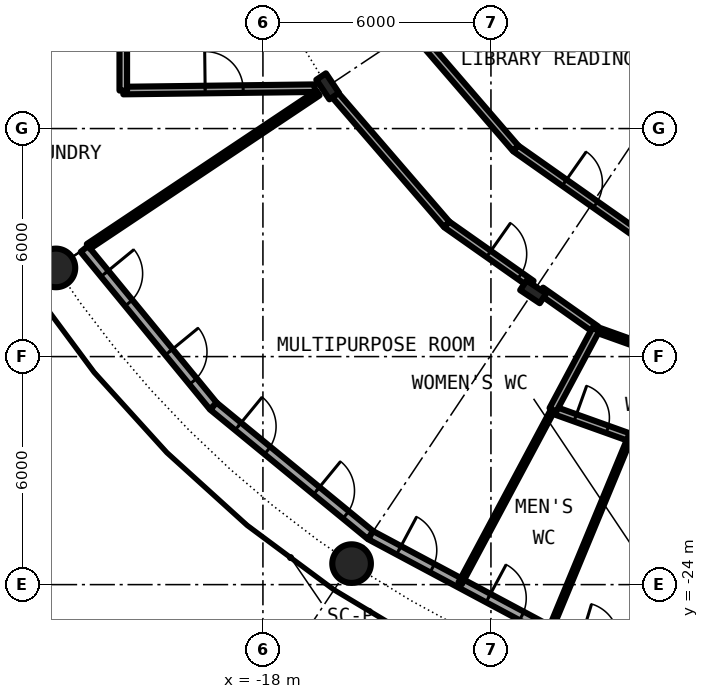
"""IFC4 building model, lengths in metres.
Left out: names, types, materials, properties, quantities, classifications, styles, units other than length and angle.
Written with IfcOpenShell. Run it as: python <this file> out.ifc"""

import sys

from ifc_helpers import new_model, si_unit, direction, frame, frame_2d, origin, origin_2d, place, context, subcontext, project, spatial, rectangle, hollow_circle, i_section, extrude, element, fill, save


model = new_model("IFC4")
c1 = context("Model", 3, precision=1e-05, world=origin(), true_north=direction((0.0, 1.0)))
c2 = subcontext(c1, "Body", "Model", "MODEL_VIEW")
j1 = project(units=[si_unit("LENGTHUNIT", "METRE"), si_unit("PLANEANGLEUNIT", "RADIAN")], contexts=[c1])
p1 = place(None, origin())
s1 = spatial("IfcSite", under=j1, at=p1, CompositionType="ELEMENT")
p2 = place(p1, origin())
s2 = spatial("IfcBuilding", under=s1, at=p2, CompositionType="ELEMENT")
p3 = place(p2, frame((0.0, 0.0, 53.3)))
s3 = spatial("IfcBuildingStorey", under=s2, at=p3, CompositionType="ELEMENT", Elevation=53.3)
for number, where, z_axis, x_axis in (
    (1, (-23.448, -15.667, 0.0), (0.0, 0.0, 1.0), (1.0, 0.0, 0.0)),
    (2, (-15.667, -23.448, 0.0), (0.0, 0.0, 1.0), (1.0, 0.0, 0.0)),
):
    element("IfcColumn", number, at=place(p3, frame(where, z_axis=z_axis, x_axis=x_axis)), inside=s3, PredefinedType="COLUMN", context=c2, shape_type="SweptSolid", body=[
        extrude(hollow_circle(Radius=0.508, WallThickness=0.05, at=origin_2d()), origin(), (0.0, 0.0, 1.0), 4.2),
    ])
for number, where, z_axis, x_axis in (
    (3, (-16.297, -10.889, 0.0), (0.0, 0.0, 1.0), (-0.831, -0.556, 0.0)),
    (4, (-10.889, -16.297, 0.0), (0.0, 0.0, 1.0), (-0.556, -0.831, 0.0)),
):
    element("IfcColumn", number, at=place(p3, frame(where, z_axis=z_axis, x_axis=x_axis)), inside=s3, PredefinedType="COLUMN", context=c2, shape_type="SweptSolid", body=[
        extrude(i_section(OverallWidth=0.305, OverallDepth=0.62, WebThickness=0.021, FlangeThickness=0.04, FilletRadius=0.027, at=origin_2d()), origin(), (0.0, 0.0, 1.0), 4.2),
    ])
p4 = place(p3, frame((-22.699, -15.167, 0.0), z_axis=(0.0, 0.0, 1.0), x_axis=(0.634382322723, -0.773019449054, 0.0)))
e5 = element("IfcWall", 5, at=p4, inside=s3, PredefinedType="SOLIDWALL", context=c2, shape_type="SweptSolid", body=[
    extrude(rectangle(XDim=5.352, YDim=0.25, at=frame_2d((2.676, 0.0))), origin(), (0.0, 0.0, 1.0), 3.8),
])
p5 = place(p4, frame((0.841, 0.0, 0.0)))
e6 = element("IfcOpeningElement", 6, at=p5, cuts=e5, PredefinedType="OPENING", context=c2, shape_type="SweptSolid", body=[
    extrude(rectangle(XDim=1.0, YDim=2.2, at=frame_2d((0.5, 1.1))), frame((0.0, 0.135, 0.0), z_axis=(0.0, -1.0, 0.0), x_axis=(1.0, 0.0, 0.0)), (0.0, 0.0, 1.0), 0.27),
])
p6 = place(p4, frame((3.51, 0.0, 0.0)))
e7 = element("IfcOpeningElement", 7, at=p6, cuts=e5, PredefinedType="OPENING", context=c2, shape_type="SweptSolid", body=[
    extrude(rectangle(XDim=1.0, YDim=2.2, at=frame_2d((0.5, 1.1))), frame((0.0, 0.135, 0.0), z_axis=(0.0, -1.0, 0.0), x_axis=(1.0, 0.0, 0.0)), (0.0, 0.0, 1.0), 0.27),
])
p7 = place(p3, frame((-19.304, -19.304, 0.0), z_axis=(0.0, 0.0, 1.0), x_axis=(0.773019449054, -0.634382322723, 0.0)))
e8 = element("IfcWall", 8, at=p7, inside=s3, PredefinedType="SOLIDWALL", context=c2, shape_type="SweptSolid", body=[
    extrude(rectangle(XDim=5.352, YDim=0.25, at=frame_2d((2.676, 0.0))), origin(), (0.0, 0.0, 1.0), 3.8),
])
p8 = place(p7, frame((0.841, 0.0, 0.0)))
e9 = element("IfcOpeningElement", 9, at=p8, cuts=e8, PredefinedType="OPENING", context=c2, shape_type="SweptSolid", body=[
    extrude(rectangle(XDim=1.0, YDim=2.2, at=frame_2d((0.5, 1.1))), frame((0.0, 0.135, 0.0), z_axis=(0.0, -1.0, 0.0), x_axis=(1.0, 0.0, 0.0)), (0.0, 0.0, 1.0), 0.27),
])
p9 = place(p7, frame((3.51, 0.0, 0.0)))
e10 = element("IfcOpeningElement", 10, at=p9, cuts=e8, PredefinedType="OPENING", context=c2, shape_type="SweptSolid", body=[
    extrude(rectangle(XDim=1.0, YDim=2.2, at=frame_2d((0.5, 1.1))), frame((0.0, 0.135, 0.0), z_axis=(0.0, -1.0, 0.0), x_axis=(1.0, 0.0, 0.0)), (0.0, 0.0, 1.0), 0.27),
])
p10 = place(p3, frame((-15.167, -22.699, 0.0), z_axis=(0.0, 0.0, 1.0), x_axis=(0.881915646801, -0.471407246368, 0.0)))
e11 = element("IfcWall", 11, at=p10, inside=s3, PredefinedType="SOLIDWALL", context=c2, shape_type="SweptSolid", body=[
    extrude(rectangle(XDim=5.352, YDim=0.25, at=frame_2d((2.676, 0.0))), origin(), (0.0, 0.0, 1.0), 3.8),
])
p11 = place(p10, frame((0.841, 0.0, 0.0)))
e12 = element("IfcOpeningElement", 12, at=p11, cuts=e11, PredefinedType="OPENING", context=c2, shape_type="SweptSolid", body=[
    extrude(rectangle(XDim=1.0, YDim=2.2, at=frame_2d((0.5, 1.1))), frame((0.0, 0.135, 0.0), z_axis=(0.0, -1.0, 0.0), x_axis=(1.0, 0.0, 0.0)), (0.0, 0.0, 1.0), 0.27),
])
p12 = place(p10, frame((3.51, 0.0, 0.0)))
e13 = element("IfcOpeningElement", 13, at=p12, cuts=e11, PredefinedType="OPENING", context=c2, shape_type="SweptSolid", body=[
    extrude(rectangle(XDim=1.0, YDim=2.2, at=frame_2d((0.5, 1.1))), frame((0.0, 0.135, 0.0), z_axis=(0.0, -1.0, 0.0), x_axis=(1.0, 0.0, 0.0)), (0.0, 0.0, 1.0), 0.27),
])
p13 = place(p3, frame((-10.373, -19.401, 0.0), z_axis=(0.0, 0.0, 1.0), x_axis=(0.941534771306, -0.336915826909, 0.0)))
e14 = element("IfcWall", 14, at=p13, inside=s3, PredefinedType="PARTITIONING", context=c2, shape_type="SweptSolid", body=[
    extrude(rectangle(XDim=6.459, YDim=0.2, at=frame_2d((3.229, 0.0))), origin(), (0.0, 0.0, 1.0), 3.8),
])
p14 = place(p13, frame((0.627, 0.0, 0.0)))
e15 = element("IfcOpeningElement", 15, at=p14, cuts=e14, PredefinedType="OPENING", context=c2, shape_type="SweptSolid", body=[
    extrude(rectangle(XDim=0.9, YDim=2.3, at=frame_2d((0.45, 1.15))), frame((0.0, 0.11, 0.0), z_axis=(0.0, -1.0, 0.0), x_axis=(1.0, 0.0, 0.0)), (0.0, 0.0, 1.0), 0.22),
])
p15 = place(p13, frame((2.781, 0.0, 0.0)))
e16 = element("IfcOpeningElement", 16, at=p15, cuts=e14, PredefinedType="OPENING", context=c2, shape_type="SweptSolid", body=[
    extrude(rectangle(XDim=0.9, YDim=2.3, at=frame_2d((0.45, 1.15))), frame((0.0, 0.11, 0.0), z_axis=(0.0, -1.0, 0.0), x_axis=(1.0, 0.0, 0.0)), (0.0, 0.0, 1.0), 0.22),
])
p16 = place(p13, frame((4.933, 0.0, 0.0)))
e17 = element("IfcOpeningElement", 17, at=p16, cuts=e14, PredefinedType="OPENING", context=c2, shape_type="SweptSolid", body=[
    extrude(rectangle(XDim=0.9, YDim=2.3, at=frame_2d((0.45, 1.15))), frame((0.0, 0.11, 0.0), z_axis=(0.0, -1.0, 0.0), x_axis=(1.0, 0.0, 0.0)), (0.0, 0.0, 1.0), 0.22),
])
p17 = place(p3, frame((-16.196, -11.006, 0.0), z_axis=(0.0, 0.0, 1.0), x_axis=(0.653087281304, -0.757282644063, 0.0)))
e18 = element("IfcWall", 18, at=p17, inside=s3, PredefinedType="PARTITIONING", context=c2, shape_type="SweptSolid", body=[
    extrude(rectangle(XDim=4.644, YDim=0.2, at=frame_2d((2.322, 0.0))), origin(), (0.0, 0.0, 1.0), 3.48),
])
p18 = place(p3, frame((-13.163, -14.523, 0.0), z_axis=(0.0, 0.0, 1.0), x_axis=(0.817764243714, -0.575553335237, 0.0)))
e19 = element("IfcWall", 19, at=p18, inside=s3, PredefinedType="PARTITIONING", context=c2, shape_type="SweptSolid", body=[
    extrude(rectangle(XDim=2.725, YDim=0.2, at=frame_2d((1.362, 0.0))), origin(), (0.0, 0.0, 1.0), 3.48),
])
p19 = place(p18, frame((1.35, 0.0, 0.0)))
e20 = element("IfcOpeningElement", 20, at=p19, cuts=e19, PredefinedType="OPENING", context=c2, shape_type="SweptSolid", body=[
    extrude(rectangle(XDim=1.0, YDim=2.3, at=frame_2d((0.5, 1.15))), frame((0.0, 0.11, 0.0), z_axis=(0.0, -1.0, 0.0), x_axis=(1.0, 0.0, 0.0)), (0.0, 0.0, 1.0), 0.22),
])
p20 = place(p3, frame((-10.686, -16.267, 0.0), z_axis=(0.0, 0.0, 1.0), x_axis=(0.81766692021, -0.575691590693, 0.0)))
e21 = element("IfcWall", 21, at=p20, inside=s3, PredefinedType="PARTITIONING", context=c2, shape_type="SweptSolid", body=[
    extrude(rectangle(XDim=1.77, YDim=0.2, at=frame_2d((0.885, 0.0))), origin(), (0.0, 0.0, 1.0), 3.48),
])
p21 = place(p3, frame((-9.239, -17.286, 0.0), z_axis=(0.0, 0.0, 1.0), x_axis=(0.94157995483, -0.336789531699, 0.0)))
e22 = element("IfcWall", 22, at=p21, inside=s3, PredefinedType="PARTITIONING", context=c2, shape_type="SweptSolid", body=[
    extrude(rectangle(XDim=5.597, YDim=0.15, at=frame_2d((2.798, 0.0))), origin(), (0.0, 0.0, 1.0), 3.48),
])
p22 = place(p21, frame((2.376, 0.0, 0.0)))
e23 = element("IfcOpeningElement", 23, at=p22, cuts=e22, PredefinedType="OPENING", context=c2, shape_type="SweptSolid", body=[
    extrude(rectangle(XDim=1.0, YDim=2.3, at=frame_2d((0.5, 1.15))), frame((0.0, 0.085, 0.0), z_axis=(0.0, -1.0, 0.0), x_axis=(1.0, 0.0, 0.0)), (0.0, 0.0, 1.0), 0.17),
])
p23 = place(p3, frame((-14.043, -9.4, 0.0), z_axis=(0.0, 0.0, 1.0), x_axis=(0.653274518104, -0.757121129012, 0.0)))
e24 = element("IfcWall", 24, at=p23, inside=s3, PredefinedType="PARTITIONING", context=c2, shape_type="SweptSolid", body=[
    extrude(rectangle(XDim=4.124, YDim=0.2, at=frame_2d((2.062, 0.0))), origin(), (0.0, 0.0, 1.0), 3.8),
])
p24 = place(p3, frame((-11.349, -12.522, 0.0), z_axis=(0.0, 0.0, 1.0), x_axis=(0.817567680547, -0.575832517079, 0.0)))
e25 = element("IfcWall", 25, at=p24, inside=s3, PredefinedType="PARTITIONING", context=c2, shape_type="SweptSolid", body=[
    extrude(rectangle(XDim=4.137, YDim=0.2, at=frame_2d((2.068, 0.0))), origin(), (0.0, 0.0, 1.0), 3.8),
])
p25 = place(p24, frame((1.568, 0.0, 0.0)))
e26 = element("IfcOpeningElement", 26, at=p25, cuts=e25, PredefinedType="OPENING", context=c2, shape_type="SweptSolid", body=[
    extrude(rectangle(XDim=1.0, YDim=2.3, at=frame_2d((0.5, 1.15))), frame((0.0, 0.11, 0.0), z_axis=(0.0, -1.0, 0.0), x_axis=(1.0, 0.0, 0.0)), (0.0, 0.0, 1.0), 0.22),
])
p26 = place(p3, frame((-21.675, -11.0, 0.0), z_axis=(0.0, 0.0, 1.0), x_axis=(0.99992425795, 0.012307654658, 0.0)))
e27 = element("IfcWall", 27, at=p26, inside=s3, PredefinedType="PARTITIONING", context=c2, shape_type="SweptSolid", body=[
    extrude(rectangle(XDim=5.039, YDim=0.2, at=frame_2d((2.519, 0.0))), origin(), (0.0, 0.0, 1.0), 3.8),
])
p27 = place(p26, frame((2.155, 0.0, 0.0)))
e28 = element("IfcOpeningElement", 28, at=p27, cuts=e27, PredefinedType="OPENING", context=c2, shape_type="SweptSolid", body=[
    extrude(rectangle(XDim=1.0, YDim=2.3, at=frame_2d((0.5, 1.15))), frame((0.0, 0.11, 0.0), z_axis=(0.0, -1.0, 0.0), x_axis=(1.0, 0.0, 0.0)), (0.0, 0.0, 1.0), 0.22),
])
p28 = place(p3, frame((-22.593, -15.101, 0.0), z_axis=(0.0, 0.0, 1.0), x_axis=(0.831491533374, 0.555537424416, 0.0)))
e29 = element("IfcWall", 29, at=p28, inside=s3, PredefinedType="PARTITIONING", context=c2, shape_type="SweptSolid", body=[
    extrude(rectangle(XDim=7.265, YDim=0.15, at=frame_2d((3.633, 0.0))), origin(), (0.0, 0.0, 1.0), 3.8),
])
p29 = place(p3, frame((-12.81, -23.966, 0.0), z_axis=(0.0, 0.0, 1.0), x_axis=(0.471464572183, 0.88188500224, 0.0)))
e30 = element("IfcWall", 30, at=p29, inside=s3, PredefinedType="PARTITIONING", context=c2, shape_type="SweptSolid", body=[
    extrude(rectangle(XDim=5.175, YDim=0.1, at=frame_2d((2.588, 0.0))), origin(), (0.0, 0.0, 1.0), 3.8),
])
p30 = place(p3, frame((-10.407, -25.103, 0.0), z_axis=(0.0, 0.0, 1.0), x_axis=(0.382973519041, 0.923759321313, 0.0)))
e31 = element("IfcWall", 31, at=p30, inside=s3, PredefinedType="PARTITIONING", context=c2, shape_type="SweptSolid", body=[
    extrude(rectangle(XDim=5.387, YDim=0.1, at=frame_2d((2.693, 0.0))), origin(), (0.0, 0.0, 1.0), 3.8),
])
p31 = place(p3, frame((-10.37, -19.402, 0.0), z_axis=(0.0, 0.0, 1.0), x_axis=(0.471385457832, 0.881927293004, 0.0)))
e32 = element("IfcWall", 32, at=p31, inside=s3, PredefinedType="PARTITIONING", context=c2, shape_type="SweptSolid", body=[
    extrude(rectangle(XDim=2.399, YDim=0.2, at=frame_2d((1.2, 0.0))), origin(), (0.0, 0.0, 1.0), 3.8),
])
p32 = place(p3, frame((-21.675, -11.0, 0.0), z_axis=(0.0, 0.0, 1.0), x_axis=(0.0, 1.0, 0.0)))
e33 = element("IfcWall", 33, at=p32, inside=s3, PredefinedType="PARTITIONING", context=c2, shape_type="SweptSolid", body=[
    extrude(rectangle(XDim=1.6, YDim=0.2, at=frame_2d((0.8, 0.0))), origin(), (0.0, 0.0, 1.0), 3.8),
])
p33 = place(p5, origin())
e34 = element("IfcDoor", 34, at=p33, inside=s3, OperationType="SINGLE_SWING_LEFT", PredefinedType="DOOR", context=c2, shape_type="SweptSolid", body=[
    extrude(rectangle(XDim=1.0, YDim=2.2, at=frame_2d((0.5, 1.1))), frame((0.0, 0.025, 0.0), z_axis=(0.0, -1.0, 0.0), x_axis=(1.0, 0.0, 0.0)), (0.0, 0.0, 1.0), 0.05),
])
fill(e6, e34)
p34 = place(p6, origin())
e35 = element("IfcDoor", 35, at=p34, inside=s3, OperationType="SINGLE_SWING_LEFT", PredefinedType="DOOR", context=c2, shape_type="SweptSolid", body=[
    extrude(rectangle(XDim=1.0, YDim=2.2, at=frame_2d((0.5, 1.1))), frame((0.0, 0.025, 0.0), z_axis=(0.0, -1.0, 0.0), x_axis=(1.0, 0.0, 0.0)), (0.0, 0.0, 1.0), 0.05),
])
fill(e7, e35)
p35 = place(p8, origin())
e36 = element("IfcDoor", 36, at=p35, inside=s3, OperationType="SINGLE_SWING_LEFT", PredefinedType="DOOR", context=c2, shape_type="SweptSolid", body=[
    extrude(rectangle(XDim=1.0, YDim=2.2, at=frame_2d((0.5, 1.1))), frame((0.0, 0.025, 0.0), z_axis=(0.0, -1.0, 0.0), x_axis=(1.0, 0.0, 0.0)), (0.0, 0.0, 1.0), 0.05),
])
fill(e9, e36)
p36 = place(p9, origin())
e37 = element("IfcDoor", 37, at=p36, inside=s3, OperationType="SINGLE_SWING_LEFT", PredefinedType="DOOR", context=c2, shape_type="SweptSolid", body=[
    extrude(rectangle(XDim=1.0, YDim=2.2, at=frame_2d((0.5, 1.1))), frame((0.0, 0.025, 0.0), z_axis=(0.0, -1.0, 0.0), x_axis=(1.0, 0.0, 0.0)), (0.0, 0.0, 1.0), 0.05),
])
fill(e10, e37)
p37 = place(p11, origin())
e38 = element("IfcDoor", 38, at=p37, inside=s3, OperationType="SINGLE_SWING_LEFT", PredefinedType="DOOR", context=c2, shape_type="SweptSolid", body=[
    extrude(rectangle(XDim=1.0, YDim=2.2, at=frame_2d((0.5, 1.1))), frame((0.0, 0.025, 0.0), z_axis=(0.0, -1.0, 0.0), x_axis=(1.0, 0.0, 0.0)), (0.0, 0.0, 1.0), 0.05),
])
fill(e12, e38)
p38 = place(p12, origin())
e39 = element("IfcDoor", 39, at=p38, inside=s3, OperationType="SINGLE_SWING_LEFT", PredefinedType="DOOR", context=c2, shape_type="SweptSolid", body=[
    extrude(rectangle(XDim=1.0, YDim=2.2, at=frame_2d((0.5, 1.1))), frame((0.0, 0.025, 0.0), z_axis=(0.0, -1.0, 0.0), x_axis=(1.0, 0.0, 0.0)), (0.0, 0.0, 1.0), 0.05),
])
fill(e13, e39)
p39 = place(p14, origin())
e40 = element("IfcDoor", 40, at=p39, inside=s3, OperationType="SINGLE_SWING_LEFT", PredefinedType="DOOR", context=c2, shape_type="SweptSolid", body=[
    extrude(rectangle(XDim=0.9, YDim=2.3, at=frame_2d((0.45, 1.15))), frame((0.0, 0.025, 0.0), z_axis=(0.0, -1.0, 0.0), x_axis=(1.0, 0.0, 0.0)), (0.0, 0.0, 1.0), 0.05),
])
fill(e15, e40)
p40 = place(p19, origin())
e41 = element("IfcDoor", 41, at=p40, inside=s3, OperationType="SINGLE_SWING_RIGHT", PredefinedType="DOOR", context=c2, shape_type="SweptSolid", body=[
    extrude(rectangle(XDim=1.0, YDim=2.3, at=frame_2d((0.5, 1.15))), frame((0.0, 0.025, 0.0), z_axis=(0.0, -1.0, 0.0), x_axis=(1.0, 0.0, 0.0)), (0.0, 0.0, 1.0), 0.05),
])
fill(e20, e41)
p41 = place(p25, origin())
e42 = element("IfcDoor", 42, at=p41, inside=s3, OperationType="SINGLE_SWING_RIGHT", PredefinedType="DOOR", context=c2, shape_type="SweptSolid", body=[
    extrude(rectangle(XDim=1.0, YDim=2.3, at=frame_2d((0.5, 1.15))), frame((0.0, 0.025, 0.0), z_axis=(0.0, -1.0, 0.0), x_axis=(1.0, 0.0, 0.0)), (0.0, 0.0, 1.0), 0.05),
])
fill(e26, e42)
p42 = place(p27, origin())
e43 = element("IfcDoor", 43, at=p42, inside=s3, OperationType="SINGLE_SWING_RIGHT", PredefinedType="DOOR", context=c2, shape_type="SweptSolid", body=[
    extrude(rectangle(XDim=1.0, YDim=2.3, at=frame_2d((0.5, 1.15))), frame((0.0, 0.025, 0.0), z_axis=(0.0, -1.0, 0.0), x_axis=(1.0, 0.0, 0.0)), (0.0, 0.0, 1.0), 0.05),
])
fill(e28, e43)
save(model, sys.argv[1])
